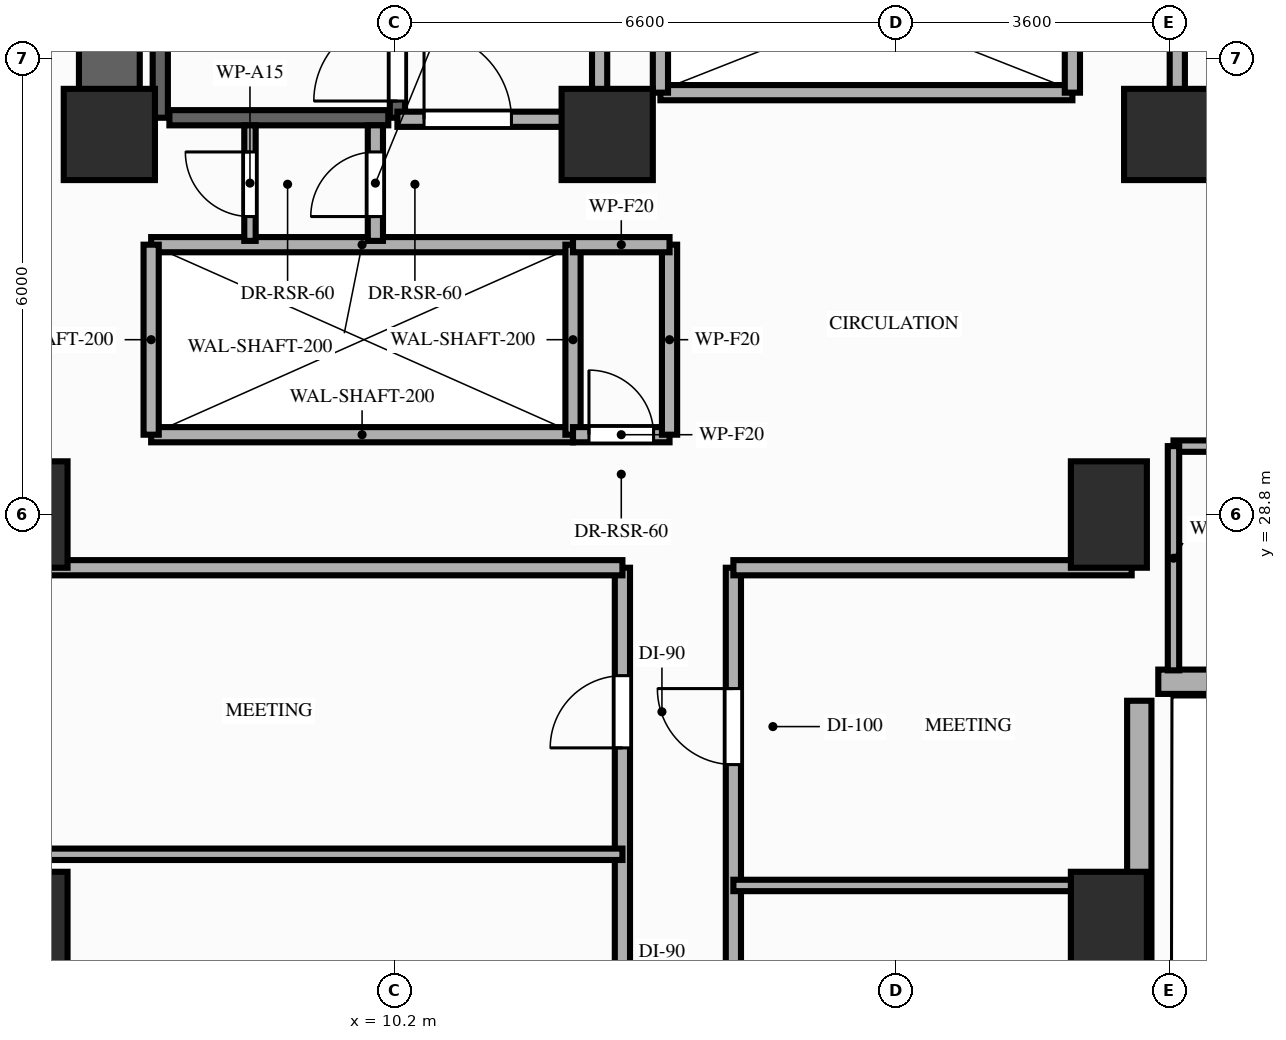
"""IFC4 building model, lengths in metres.
Left out: names, types, materials, properties, quantities, classifications, styles, units other than length and angle.
Written with IfcOpenShell. Run it as: python <this file> out.ifc"""

import sys

from ifc_helpers import new_model, si_unit, direction, frame, frame_2d, origin, origin_2d, place, context, subcontext, project, spatial, rectangle, extrude, element, fill, save


model = new_model("IFC4")
c1 = context("Model", 3, precision=1e-05, world=origin(), true_north=direction((0.0, 1.0)))
c2 = subcontext(c1, "Body", "Model", "MODEL_VIEW")
j1 = project(units=[si_unit("LENGTHUNIT", "METRE"), si_unit("PLANEANGLEUNIT", "RADIAN")], contexts=[c1])
p1 = place(None, origin())
s1 = spatial("IfcSite", under=j1, at=p1, CompositionType="ELEMENT")
p2 = place(p1, origin())
s2 = spatial("IfcBuilding", under=s1, at=p2, CompositionType="ELEMENT")
p3 = place(p2, frame((0.0, 0.0, 43.6)))
s3 = spatial("IfcBuildingStorey", under=s2, at=p3, CompositionType="ELEMENT", Elevation=43.6)
for number, where, z_axis, x_axis in (
    (1, (6.45, 33.8, 0.0), (0.0, 0.0, 1.0), (1.0, 0.0, 0.0)),
    (2, (13.0, 33.8, 0.0), (0.0, 0.0, 1.0), (1.0, 0.0, 0.0)),
    (3, (20.4, 33.8, 0.0), (0.0, 0.0, 1.0), (1.0, 0.0, 0.0)),
):
    element("IfcColumn", number, at=place(p3, frame(where, z_axis=z_axis, x_axis=x_axis)), inside=s3, PredefinedType="COLUMN", context=c2, shape_type="SweptSolid", body=[
        extrude(rectangle(XDim=1.2, YDim=1.2, at=origin_2d()), origin(), (0.0, 0.0, 1.0), 3.2),
    ])
for number, where, z_axis, x_axis in (
    (4, (5.4, 23.4, 0.0), (0.0, 0.0, 1.0), (1.0, 0.0, 0.0)),
    (5, (19.6, 23.4, 0.0), (0.0, 0.0, 1.0), (1.0, 0.0, 0.0)),
    (6, (5.4, 28.8, 0.0), (0.0, 0.0, 1.0), (1.0, 0.0, 0.0)),
    (7, (19.6, 28.8, 0.0), (0.0, 0.0, 1.0), (1.0, 0.0, 0.0)),
):
    element("IfcColumn", number, at=place(p3, frame(where, z_axis=z_axis, x_axis=x_axis)), inside=s3, PredefinedType="COLUMN", context=c2, shape_type="SweptSolid", body=[
        extrude(rectangle(XDim=1.0, YDim=1.4, at=origin_2d()), origin(), (0.0, 0.0, 1.0), 3.2),
    ])
p4 = place(p3, frame((20.0, 8.8, 0.0), z_axis=(0.0, 0.0, 1.0), x_axis=(0.0, 1.0, 0.0)))
e8 = element("IfcWall", 8, at=p4, inside=s3, PredefinedType="STANDARD", context=c2, shape_type="SweptSolid", body=[
    extrude(rectangle(XDim=17.55, YDim=0.32, at=frame_2d((8.775, 0.0))), origin(), (0.0, 0.0, 1.0), 2.41),
])
p5 = place(p4, frame((10.7, 0.0, 0.85)))
e9 = element("IfcOpeningElement", 9, at=p5, cuts=e8, PredefinedType="OPENING", context=c2, shape_type="SweptSolid", body=[
    extrude(rectangle(XDim=2.4, YDim=1.31, at=frame_2d((1.2, 0.655))), frame((0.0, 0.17, 0.0), z_axis=(0.0, -1.0, 0.0), x_axis=(1.0, 0.0, 0.0)), (0.0, 0.0, 1.0), 0.34),
])
p6 = place(p3, frame((20.25, 26.6, 0.0), z_axis=(0.0, 0.0, 1.0), x_axis=(1.0, 0.0, 0.0)))
e10 = element("IfcWall", 10, at=p6, inside=s3, PredefinedType="STANDARD", context=c2, shape_type="SweptSolid", body=[
    extrude(rectangle(XDim=26.15, YDim=0.32, at=frame_2d((13.075, 0.0))), origin(), (0.0, 0.0, 1.0), 2.7),
])
p7 = place(p6, frame((1.95, 0.0, 0.85)))
e11 = element("IfcOpeningElement", 11, at=p7, cuts=e10, PredefinedType="OPENING", context=c2, shape_type="SweptSolid", body=[
    extrude(rectangle(XDim=2.4, YDim=1.6, at=frame_2d((1.2, 0.8))), frame((0.0, 0.17, 0.0), z_axis=(0.0, -1.0, 0.0), x_axis=(1.0, 0.0, 0.0)), (0.0, 0.0, 1.0), 0.34),
])
p8 = place(p6, frame((7.45, 0.0, 0.85)))
e12 = element("IfcOpeningElement", 12, at=p8, cuts=e10, PredefinedType="OPENING", context=c2, shape_type="SweptSolid", body=[
    extrude(rectangle(XDim=2.4, YDim=1.6, at=frame_2d((1.2, 0.8))), frame((0.0, 0.17, 0.0), z_axis=(0.0, -1.0, 0.0), x_axis=(1.0, 0.0, 0.0)), (0.0, 0.0, 1.0), 0.34),
])
p9 = place(p6, frame((21.95, 0.0, 0.85)))
e13 = element("IfcOpeningElement", 13, at=p9, cuts=e10, PredefinedType="OPENING", context=c2, shape_type="SweptSolid", body=[
    extrude(rectangle(XDim=2.4, YDim=1.6, at=frame_2d((1.2, 0.8))), frame((0.0, 0.17, 0.0), z_axis=(0.0, -1.0, 0.0), x_axis=(1.0, 0.0, 0.0)), (0.0, 0.0, 1.0), 0.34),
])
p10 = place(p3, frame((6.45, 33.8, 0.0), z_axis=(0.0, 0.0, 1.0), x_axis=(0.0, 1.0, 0.0)))
e14 = element("IfcWall", 14, at=p10, inside=s3, PredefinedType="SHEAR", context=c2, shape_type="SweptSolid", body=[
    extrude(rectangle(XDim=7.95, YDim=0.8, at=frame_2d((3.975, 0.0))), origin(), (0.0, 0.0, 1.0), 3.02),
])
p11 = place(p3, frame((7.12, 34.02, 0.0), z_axis=(0.0, 0.0, 1.0), x_axis=(0.0, 1.0, 0.0)))
e15 = element("IfcWall", 15, at=p11, inside=s3, PredefinedType="SHEAR", context=c2, shape_type="SweptSolid", body=[
    extrude(rectangle(XDim=7.78, YDim=0.2, at=frame_2d((3.89, 0.0))), origin(), (0.0, 0.0, 1.0), 3.02),
])
p12 = place(p3, frame((10.24, 34.02, 0.0), z_axis=(0.0, 0.0, 1.0), x_axis=(0.0, 1.0, 0.0)))
e16 = element("IfcWall", 16, at=p12, inside=s3, PredefinedType="SHEAR", context=c2, shape_type="SweptSolid", body=[
    extrude(rectangle(XDim=7.78, YDim=0.2, at=frame_2d((3.89, 0.0))), origin(), (0.0, 0.0, 1.0), 3.02),
])
p13 = place(p12, frame((0.22, 0.0, 0.0)))
e17 = element("IfcOpeningElement", 17, at=p13, cuts=e16, PredefinedType="OPENING", context=c2, shape_type="SweptSolid", body=[
    extrude(rectangle(XDim=1.1, YDim=2.15, at=frame_2d((0.55, 1.075))), frame((0.0, 0.11, 0.0), z_axis=(0.0, -1.0, 0.0), x_axis=(1.0, 0.0, 0.0)), (0.0, 0.0, 1.0), 0.22),
])
p14 = place(p3, frame((7.24, 34.02, 0.0), z_axis=(0.0, 0.0, 1.0), x_axis=(1.0, 0.0, 0.0)))
e18 = element("IfcWall", 18, at=p14, inside=s3, PredefinedType="SHEAR", context=c2, shape_type="SweptSolid", body=[
    extrude(rectangle(XDim=2.88, YDim=0.2, at=frame_2d((1.44, 0.0))), origin(), (0.0, 0.0, 1.0), 3.02),
])
for number, where, z_axis, x_axis in (
    (19, (7.0, 29.85, 0.0), (0.0, 0.0, 1.0), (1.0, 0.0, 0.0)),
    (20, (7.0, 32.35, 0.0), (0.0, 0.0, 1.0), (1.0, 0.0, 0.0)),
):
    element("IfcWall", number, at=place(p3, frame(where, z_axis=z_axis, x_axis=x_axis)), inside=s3, PredefinedType="MOVABLE", context=c2, shape_type="SweptSolid", body=[
        extrude(rectangle(XDim=5.55, YDim=0.2, at=frame_2d((2.775, 0.0))), origin(), (0.0, 0.0, 1.0), 3.02),
    ])
for number, where, z_axis, x_axis in (
    (21, (7.0, 29.85, 0.0), (0.0, 0.0, 1.0), (0.0, 1.0, 0.0)),
    (22, (12.55, 29.85, 0.0), (0.0, 0.0, 1.0), (0.0, 1.0, 0.0)),
):
    element("IfcWall", number, at=place(p3, frame(where, z_axis=z_axis, x_axis=x_axis)), inside=s3, PredefinedType="MOVABLE", context=c2, shape_type="SweptSolid", body=[
        extrude(rectangle(XDim=2.5, YDim=0.2, at=frame_2d((1.25, 0.0))), origin(), (0.0, 0.0, 1.0), 3.02),
    ])
p15 = place(p3, frame((12.9, 34.0, 0.0), z_axis=(0.0, 0.0, 1.0), x_axis=(0.0, 1.0, 0.0)))
e23 = element("IfcWall", 23, at=p15, inside=s3, PredefinedType="PARTITIONING", context=c2, shape_type="SweptSolid", body=[
    extrude(rectangle(XDim=5.45, YDim=0.2, at=frame_2d((2.725, 0.0))), origin(), (0.0, 0.0, 1.0), 2.41),
])
p16 = place(p3, frame((10.24, 34.0, 0.0), z_axis=(0.0, 0.0, 1.0), x_axis=(1.0, 0.0, 0.0)))
e24 = element("IfcWall", 24, at=p16, inside=s3, PredefinedType="PARTITIONING", context=c2, shape_type="SweptSolid", body=[
    extrude(rectangle(XDim=2.66, YDim=0.2, at=frame_2d((1.33, 0.0))), origin(), (0.0, 0.0, 1.0), 2.41),
])
p17 = place(p16, frame((0.35, 0.0, 0.0)))
e25 = element("IfcOpeningElement", 25, at=p17, cuts=e24, PredefinedType="OPENING", context=c2, shape_type="SweptSolid", body=[
    extrude(rectangle(XDim=1.15, YDim=2.15, at=frame_2d((0.575, 1.075))), frame((0.0, 0.11, 0.0), z_axis=(0.0, -1.0, 0.0), x_axis=(1.0, 0.0, 0.0)), (0.0, 0.0, 1.0), 0.22),
])
p18 = place(p3, frame((20.5, 34.0, 0.0), z_axis=(0.0, 0.0, 1.0), x_axis=(0.0, 1.0, 0.0)))
e26 = element("IfcWall", 26, at=p18, inside=s3, PredefinedType="PARTITIONING", context=c2, shape_type="SweptSolid", body=[
    extrude(rectangle(XDim=5.45, YDim=0.2, at=frame_2d((2.725, 0.0))), origin(), (0.0, 0.0, 1.0), 2.41),
])
p19 = place(p3, frame((20.5, 34.0, 0.0), z_axis=(0.0, 0.0, 1.0), x_axis=(1.0, 0.0, 0.0)))
e27 = element("IfcWall", 27, at=p19, inside=s3, PredefinedType="PARTITIONING", context=c2, shape_type="SweptSolid", body=[
    extrude(rectangle(XDim=2.6, YDim=0.2, at=frame_2d((1.3, 0.0))), origin(), (0.0, 0.0, 1.0), 2.41),
])
p20 = place(p19, frame((1.05, 0.0, 0.0)))
e28 = element("IfcOpeningElement", 28, at=p20, cuts=e27, PredefinedType="OPENING", context=c2, shape_type="SweptSolid", body=[
    extrude(rectangle(XDim=1.15, YDim=2.15, at=frame_2d((0.575, 1.075))), frame((0.0, 0.11, 0.0), z_axis=(0.0, -1.0, 0.0), x_axis=(1.0, 0.0, 0.0)), (0.0, 0.0, 1.0), 0.22),
])
p21 = place(p3, frame((9.95, 32.4, 0.0), z_axis=(0.0, 0.0, 1.0), x_axis=(0.0, 1.0, 0.0)))
e29 = element("IfcWall", 29, at=p21, inside=s3, PredefinedType="PARTITIONING", context=c2, shape_type="SweptSolid", body=[
    extrude(rectangle(XDim=1.52, YDim=0.2, at=frame_2d((0.76, 0.0))), origin(), (0.0, 0.0, 1.0), 2.41),
])
p22 = place(p21, frame((0.32, 0.0, 0.0)))
e30 = element("IfcOpeningElement", 30, at=p22, cuts=e29, PredefinedType="OPENING", context=c2, shape_type="SweptSolid", body=[
    extrude(rectangle(XDim=0.85, YDim=2.05, at=frame_2d((0.425, 1.025))), frame((0.0, 0.11, 0.0), z_axis=(0.0, -1.0, 0.0), x_axis=(1.0, 0.0, 0.0)), (0.0, 0.0, 1.0), 0.22),
])
p23 = place(p3, frame((8.3, 32.4, 0.0), z_axis=(0.0, 0.0, 1.0), x_axis=(0.0, 1.0, 0.0)))
e31 = element("IfcWall", 31, at=p23, inside=s3, PredefinedType="PARTITIONING", context=c2, shape_type="SweptSolid", body=[
    extrude(rectangle(XDim=1.52, YDim=0.15, at=frame_2d((0.76, 0.0))), origin(), (0.0, 0.0, 1.0), 2.41),
])
p24 = place(p23, frame((0.32, 0.0, 0.0)))
e32 = element("IfcOpeningElement", 32, at=p24, cuts=e31, PredefinedType="OPENING", context=c2, shape_type="SweptSolid", body=[
    extrude(rectangle(XDim=0.85, YDim=2.05, at=frame_2d((0.425, 1.025))), frame((0.0, 0.085, 0.0), z_axis=(0.0, -1.0, 0.0), x_axis=(1.0, 0.0, 0.0)), (0.0, 0.0, 1.0), 0.17),
])
p25 = place(p3, frame((12.55, 29.85, 0.0), z_axis=(0.0, 0.0, 1.0), x_axis=(1.0, 0.0, 0.0)))
e33 = element("IfcWall", 33, at=p25, inside=s3, PredefinedType="PARTITIONING", context=c2, shape_type="SweptSolid", body=[
    extrude(rectangle(XDim=1.27, YDim=0.2, at=frame_2d((0.635, 0.0))), origin(), (0.0, 0.0, 1.0), 3.02),
])
p26 = place(p25, frame((0.21, 0.0, 0.0)))
e34 = element("IfcOpeningElement", 34, at=p26, cuts=e33, PredefinedType="OPENING", context=c2, shape_type="SweptSolid", body=[
    extrude(rectangle(XDim=0.85, YDim=2.05, at=frame_2d((0.425, 1.025))), frame((0.0, 0.11, 0.0), z_axis=(0.0, -1.0, 0.0), x_axis=(1.0, 0.0, 0.0)), (0.0, 0.0, 1.0), 0.22),
])
p27 = place(p3, frame((13.82, 29.85, 0.0), z_axis=(0.0, 0.0, 1.0), x_axis=(0.0, 1.0, 0.0)))
e35 = element("IfcWall", 35, at=p27, inside=s3, PredefinedType="PARTITIONING", context=c2, shape_type="SweptSolid", body=[
    extrude(rectangle(XDim=2.5, YDim=0.2, at=frame_2d((1.25, 0.0))), origin(), (0.0, 0.0, 1.0), 3.02),
])
p28 = place(p3, frame((12.55, 32.35, 0.0), z_axis=(0.0, 0.0, 1.0), x_axis=(1.0, 0.0, 0.0)))
e36 = element("IfcWall", 36, at=p28, inside=s3, PredefinedType="PARTITIONING", context=c2, shape_type="SweptSolid", body=[
    extrude(rectangle(XDim=1.27, YDim=0.2, at=frame_2d((0.635, 0.0))), origin(), (0.0, 0.0, 1.0), 3.02),
])
p29 = place(p3, frame((13.7, 34.35, 0.0), z_axis=(0.0, 0.0, 1.0), x_axis=(1.0, 0.0, 0.0)))
e37 = element("IfcWall", 37, at=p29, inside=s3, PredefinedType="MOVABLE", context=c2, shape_type="SweptSolid", body=[
    extrude(rectangle(XDim=5.42, YDim=0.2, at=frame_2d((2.71, 0.0))), origin(), (0.0, 0.0, 1.0), 3.02),
])
for number, where, z_axis, x_axis in (
    (38, (13.7, 34.35, 0.0), (0.0, 0.0, 1.0), (0.0, 1.0, 0.0)),
    (39, (19.12, 34.35, 0.0), (0.0, 0.0, 1.0), (0.0, 1.0, 0.0)),
):
    element("IfcWall", number, at=place(p3, frame(where, z_axis=z_axis, x_axis=x_axis)), inside=s3, PredefinedType="MOVABLE", context=c2, shape_type="SweptSolid", body=[
        extrude(rectangle(XDim=2.2, YDim=0.2, at=frame_2d((1.1, 0.0))), origin(), (0.0, 0.0, 1.0), 3.02),
    ])
p30 = place(p3, frame((13.2, 12.4, 0.0), z_axis=(0.0, 0.0, 1.0), x_axis=(0.0, 1.0, 0.0)))
e40 = element("IfcWall", 40, at=p30, inside=s3, PredefinedType="PARTITIONING", context=c2, shape_type="SweptSolid", body=[
    extrude(rectangle(XDim=15.7, YDim=0.2, at=frame_2d((7.85, 0.0))), origin(), (0.0, 0.0, 1.0), 2.41),
])
p31 = place(p30, frame((1.72, 0.0, 0.0)))
e41 = element("IfcOpeningElement", 41, at=p31, cuts=e40, PredefinedType="OPENING", context=c2, shape_type="SweptSolid", body=[
    extrude(rectangle(XDim=0.95, YDim=2.15, at=frame_2d((0.475, 1.075))), frame((0.0, 0.11, 0.0), z_axis=(0.0, -1.0, 0.0), x_axis=(1.0, 0.0, 0.0)), (0.0, 0.0, 1.0), 0.22),
])
p32 = place(p30, frame((5.64, 0.0, 0.0)))
e42 = element("IfcOpeningElement", 42, at=p32, cuts=e40, PredefinedType="OPENING", context=c2, shape_type="SweptSolid", body=[
    extrude(rectangle(XDim=0.95, YDim=2.15, at=frame_2d((0.475, 1.075))), frame((0.0, 0.11, 0.0), z_axis=(0.0, -1.0, 0.0), x_axis=(1.0, 0.0, 0.0)), (0.0, 0.0, 1.0), 0.22),
])
p33 = place(p30, frame((9.41, 0.0, 0.0)))
e43 = element("IfcOpeningElement", 43, at=p33, cuts=e40, PredefinedType="OPENING", context=c2, shape_type="SweptSolid", body=[
    extrude(rectangle(XDim=0.95, YDim=2.15, at=frame_2d((0.475, 1.075))), frame((0.0, 0.11, 0.0), z_axis=(0.0, -1.0, 0.0), x_axis=(1.0, 0.0, 0.0)), (0.0, 0.0, 1.0), 0.22),
])
p34 = place(p30, frame((13.33, 0.0, 0.0)))
e44 = element("IfcOpeningElement", 44, at=p34, cuts=e40, PredefinedType="OPENING", context=c2, shape_type="SweptSolid", body=[
    extrude(rectangle(XDim=0.95, YDim=2.15, at=frame_2d((0.475, 1.075))), frame((0.0, 0.11, 0.0), z_axis=(0.0, -1.0, 0.0), x_axis=(1.0, 0.0, 0.0)), (0.0, 0.0, 1.0), 0.22),
])
p35 = place(p3, frame((14.66, 12.4, 0.0), z_axis=(0.0, 0.0, 1.0), x_axis=(0.0, 1.0, 0.0)))
e45 = element("IfcWall", 45, at=p35, inside=s3, PredefinedType="PARTITIONING", context=c2, shape_type="SweptSolid", body=[
    extrude(rectangle(XDim=15.7, YDim=0.2, at=frame_2d((7.85, 0.0))), origin(), (0.0, 0.0, 1.0), 2.41),
])
p36 = place(p35, frame((0.45, 0.0, 0.0)))
e46 = element("IfcOpeningElement", 46, at=p36, cuts=e45, PredefinedType="OPENING", context=c2, shape_type="SweptSolid", body=[
    extrude(rectangle(XDim=0.85, YDim=2.1, at=frame_2d((0.425, 1.05))), frame((0.0, 0.11, 0.0), z_axis=(0.0, -1.0, 0.0), x_axis=(1.0, 0.0, 0.0)), (0.0, 0.0, 1.0), 0.22),
])
p37 = place(p35, frame((2.65, 0.0, 0.0)))
e47 = element("IfcOpeningElement", 47, at=p37, cuts=e45, PredefinedType="OPENING", context=c2, shape_type="SweptSolid", body=[
    extrude(rectangle(XDim=0.95, YDim=2.1, at=frame_2d((0.475, 1.05))), frame((0.0, 0.11, 0.0), z_axis=(0.0, -1.0, 0.0), x_axis=(1.0, 0.0, 0.0)), (0.0, 0.0, 1.0), 0.22),
])
p38 = place(p35, frame((7.46, 0.0, 0.0)))
e48 = element("IfcOpeningElement", 48, at=p38, cuts=e45, PredefinedType="OPENING", context=c2, shape_type="SweptSolid", body=[
    extrude(rectangle(XDim=1.0, YDim=2.15, at=frame_2d((0.5, 1.075))), frame((0.0, 0.11, 0.0), z_axis=(0.0, -1.0, 0.0), x_axis=(1.0, 0.0, 0.0)), (0.0, 0.0, 1.0), 0.22),
])
p39 = place(p35, frame((13.11, 0.0, 0.0)))
e49 = element("IfcOpeningElement", 49, at=p39, cuts=e45, PredefinedType="OPENING", context=c2, shape_type="SweptSolid", body=[
    extrude(rectangle(XDim=1.0, YDim=2.15, at=frame_2d((0.5, 1.075))), frame((0.0, 0.11, 0.0), z_axis=(0.0, -1.0, 0.0), x_axis=(1.0, 0.0, 0.0)), (0.0, 0.0, 1.0), 0.22),
])
p40 = place(p3, frame((3.9, 28.1, 0.0), z_axis=(0.0, 0.0, 1.0), x_axis=(1.0, 0.0, 0.0)))
e50 = element("IfcWall", 50, at=p40, inside=s3, PredefinedType="PARTITIONING", context=c2, shape_type="SweptSolid", body=[
    extrude(rectangle(XDim=9.3, YDim=0.2, at=frame_2d((4.65, 0.0))), origin(), (0.0, 0.0, 1.0), 2.41),
])
p41 = place(p3, frame((14.66, 28.1, 0.0), z_axis=(0.0, 0.0, 1.0), x_axis=(1.0, 0.0, 0.0)))
e51 = element("IfcWall", 51, at=p41, inside=s3, PredefinedType="PARTITIONING", context=c2, shape_type="SweptSolid", body=[
    extrude(rectangle(XDim=5.24, YDim=0.2, at=frame_2d((2.62, 0.0))), origin(), (0.0, 0.0, 1.0), 2.41),
])
p42 = place(p3, frame((20.45, 29.7, 0.0), z_axis=(0.0, 0.0, 1.0), x_axis=(1.0, 0.0, 0.0)))
e52 = element("IfcWall", 52, at=p42, inside=s3, PredefinedType="PARTITIONING", context=c2, shape_type="SweptSolid", body=[
    extrude(rectangle(XDim=6.7, YDim=0.15, at=frame_2d((3.35, 0.0))), origin(), (0.0, 0.0, 1.0), 3.02),
])
p43 = place(p42, frame((2.8, 0.0, 0.0)))
e53 = element("IfcOpeningElement", 53, at=p43, cuts=e52, PredefinedType="OPENING", context=c2, shape_type="SweptSolid", body=[
    extrude(rectangle(XDim=0.95, YDim=2.15, at=frame_2d((0.475, 1.075))), frame((0.0, 0.085, 0.0), z_axis=(0.0, -1.0, 0.0), x_axis=(1.0, 0.0, 0.0)), (0.0, 0.0, 1.0), 0.17),
])
p44 = place(p3, frame((20.45, 26.75, 0.0), z_axis=(0.0, 0.0, 1.0), x_axis=(0.0, 1.0, 0.0)))
e54 = element("IfcWall", 54, at=p44, inside=s3, PredefinedType="PARTITIONING", context=c2, shape_type="SweptSolid", body=[
    extrude(rectangle(XDim=2.95, YDim=0.15, at=frame_2d((1.475, 0.0))), origin(), (0.0, 0.0, 1.0), 2.41),
])
p45 = place(p3, frame((3.9, 24.33, 0.0), z_axis=(0.0, 0.0, 1.0), x_axis=(1.0, 0.0, 0.0)))
e55 = element("IfcWall", 55, at=p45, inside=s3, PredefinedType="PARTITIONING", context=c2, shape_type="SweptSolid", body=[
    extrude(rectangle(XDim=9.3, YDim=0.15, at=frame_2d((4.65, 0.0))), origin(), (0.0, 0.0, 1.0), 2.41),
])
p46 = place(p3, frame((14.66, 23.92, 0.0), z_axis=(0.0, 0.0, 1.0), x_axis=(1.0, 0.0, 0.0)))
e56 = element("IfcWall", 56, at=p46, inside=s3, PredefinedType="PARTITIONING", context=c2, shape_type="SweptSolid", body=[
    extrude(rectangle(XDim=5.24, YDim=0.15, at=frame_2d((2.62, 0.0))), origin(), (0.0, 0.0, 1.0), 2.41),
])
p47 = place(p13, origin())
e57 = element("IfcDoor", 57, at=p47, inside=s3, OperationType="SINGLE_SWING_LEFT", PredefinedType="DOOR", context=c2, shape_type="SweptSolid", body=[
    extrude(rectangle(XDim=1.1, YDim=2.15, at=frame_2d((0.55, 1.075))), frame((0.0, 0.025, 0.0), z_axis=(0.0, -1.0, 0.0), x_axis=(1.0, 0.0, 0.0)), (0.0, 0.0, 1.0), 0.05),
])
fill(e17, e57)
p48 = place(p17, origin())
e58 = element("IfcDoor", 58, at=p48, inside=s3, OperationType="SINGLE_SWING_LEFT", PredefinedType="DOOR", context=c2, shape_type="SweptSolid", body=[
    extrude(rectangle(XDim=1.15, YDim=2.15, at=frame_2d((0.575, 1.075))), frame((0.0, 0.025, 0.0), z_axis=(0.0, -1.0, 0.0), x_axis=(1.0, 0.0, 0.0)), (0.0, 0.0, 1.0), 0.05),
])
fill(e25, e58)
p49 = place(p22, origin())
e59 = element("IfcDoor", 59, at=p49, inside=s3, OperationType="SINGLE_SWING_LEFT", PredefinedType="DOOR", context=c2, shape_type="SweptSolid", body=[
    extrude(rectangle(XDim=0.85, YDim=2.05, at=frame_2d((0.425, 1.025))), frame((0.0, 0.025, 0.0), z_axis=(0.0, -1.0, 0.0), x_axis=(1.0, 0.0, 0.0)), (0.0, 0.0, 1.0), 0.05),
])
fill(e30, e59)
p50 = place(p24, origin())
e60 = element("IfcDoor", 60, at=p50, inside=s3, OperationType="SINGLE_SWING_RIGHT", PredefinedType="DOOR", context=c2, shape_type="SweptSolid", body=[
    extrude(rectangle(XDim=0.85, YDim=2.05, at=frame_2d((0.425, 1.025))), frame((0.0, 0.025, 0.0), z_axis=(0.0, -1.0, 0.0), x_axis=(1.0, 0.0, 0.0)), (0.0, 0.0, 1.0), 0.05),
])
fill(e32, e60)
p51 = place(p26, origin())
e61 = element("IfcDoor", 61, at=p51, inside=s3, OperationType="SINGLE_SWING_LEFT", PredefinedType="DOOR", context=c2, shape_type="SweptSolid", body=[
    extrude(rectangle(XDim=0.85, YDim=2.05, at=frame_2d((0.425, 1.025))), frame((0.0, 0.025, 0.0), z_axis=(0.0, -1.0, 0.0), x_axis=(1.0, 0.0, 0.0)), (0.0, 0.0, 1.0), 0.05),
])
fill(e34, e61)
p52 = place(p34, origin())
e62 = element("IfcDoor", 62, at=p52, inside=s3, OperationType="SINGLE_SWING_LEFT", PredefinedType="DOOR", context=c2, shape_type="SweptSolid", body=[
    extrude(rectangle(XDim=0.95, YDim=2.15, at=frame_2d((0.475, 1.075))), frame((0.0, 0.025, 0.0), z_axis=(0.0, -1.0, 0.0), x_axis=(1.0, 0.0, 0.0)), (0.0, 0.0, 1.0), 0.05),
])
fill(e44, e62)
p53 = place(p39, origin())
e63 = element("IfcDoor", 63, at=p53, inside=s3, OperationType="SINGLE_SWING_RIGHT", PredefinedType="DOOR", context=c2, shape_type="SweptSolid", body=[
    extrude(rectangle(XDim=1.0, YDim=2.15, at=frame_2d((0.5, 1.075))), frame((0.0, 0.025, 0.0), z_axis=(0.0, -1.0, 0.0), x_axis=(1.0, 0.0, 0.0)), (0.0, 0.0, 1.0), 0.05),
])
fill(e49, e63)
save(model, sys.argv[1])
